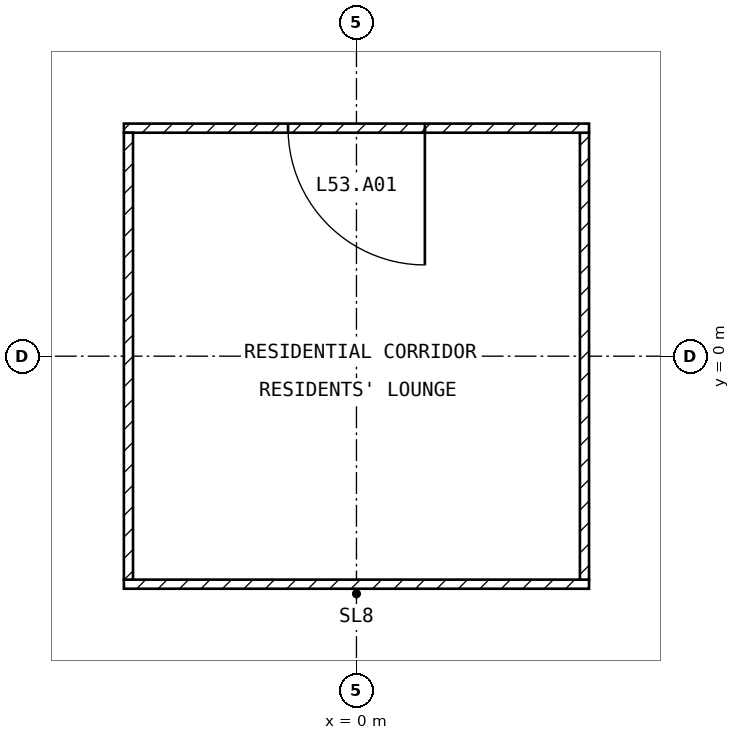
"""IFC4 building model, lengths in metres.
Left out: names, types, materials, properties, quantities, classifications, styles, units other than length and angle.
Written with IfcOpenShell. Run it as: python <this file> out.ifc"""

import sys

from ifc_helpers import new_model, si_unit, direction, frame, frame_2d, origin, place, context, subcontext, project, spatial, rectangle, extrude, element, fill, save


model = new_model("IFC4")
c1 = context("Model", 3, precision=1e-05, world=origin(), true_north=direction((0.0, 1.0)))
c2 = subcontext(c1, "Body", "Model", "MODEL_VIEW")
j1 = project(units=[si_unit("LENGTHUNIT", "METRE"), si_unit("PLANEANGLEUNIT", "RADIAN")], contexts=[c1])
p1 = place(None, origin())
s1 = spatial("IfcSite", under=j1, at=p1, CompositionType="ELEMENT")
p2 = place(p1, origin())
s2 = spatial("IfcBuilding", under=s1, at=p2, CompositionType="ELEMENT")
p3 = place(p2, frame((0.0, 0.0, 212.1)))
s3 = spatial("IfcBuildingStorey", under=s2, at=p3, CompositionType="ELEMENT", Elevation=212.1)
p4 = place(p3, frame((-3.06, -3.0, 0.0), z_axis=(0.0, 0.0, 1.0), x_axis=(1.0, 0.0, 0.0)))
e1 = element("IfcWall", 1, at=p4, inside=s3, PredefinedType="PARTITIONING", context=c2, shape_type="SweptSolid", body=[
    extrude(rectangle(XDim=6.12, YDim=0.12, at=frame_2d((3.06, 0.0))), origin(), (0.0, 0.0, 1.0), 3.25),
])
p5 = place(p3, frame((3.0, -2.94, 0.0), z_axis=(0.0, 0.0, 1.0), x_axis=(0.0, 1.0, 0.0)))
e2 = element("IfcWall", 2, at=p5, inside=s3, PredefinedType="PARTITIONING", context=c2, shape_type="SweptSolid", body=[
    extrude(rectangle(XDim=5.88, YDim=0.12, at=frame_2d((2.94, 0.0))), origin(), (0.0, 0.0, 1.0), 3.25),
])
p6 = place(p3, frame((3.06, 3.0, 0.0), z_axis=(0.0, 0.0, 1.0), x_axis=(-1.0, 0.0, 0.0)))
e3 = element("IfcWall", 3, at=p6, inside=s3, PredefinedType="PARTITIONING", context=c2, shape_type="SweptSolid", body=[
    extrude(rectangle(XDim=6.12, YDim=0.12, at=frame_2d((3.06, 0.0))), origin(), (0.0, 0.0, 1.0), 3.25),
])
p7 = place(p6, frame((2.16, 0.0, 0.0)))
e4 = element("IfcOpeningElement", 4, at=p7, cuts=e3, PredefinedType="OPENING", context=c2, shape_type="SweptSolid", body=[
    extrude(rectangle(XDim=1.8, YDim=2.1, at=frame_2d((0.9, 1.05))), frame((0.0, 0.07, 0.0), z_axis=(0.0, -1.0, 0.0), x_axis=(1.0, 0.0, 0.0)), (0.0, 0.0, 1.0), 0.14),
])
p8 = place(p3, frame((-3.0, 2.94, 0.0), z_axis=(0.0, 0.0, 1.0), x_axis=(0.0, -1.0, 0.0)))
e5 = element("IfcWall", 5, at=p8, inside=s3, PredefinedType="PARTITIONING", context=c2, shape_type="SweptSolid", body=[
    extrude(rectangle(XDim=5.88, YDim=0.12, at=frame_2d((2.94, 0.0))), origin(), (0.0, 0.0, 1.0), 3.25),
])
p9 = place(p7, origin())
e6 = element("IfcDoor", 6, at=p9, inside=s3, OperationType="SINGLE_SWING_LEFT", PredefinedType="DOOR", context=c2, shape_type="SweptSolid", body=[
    extrude(rectangle(XDim=1.8, YDim=2.1, at=frame_2d((0.9, 1.05))), frame((0.0, 0.025, 0.0), z_axis=(0.0, -1.0, 0.0), x_axis=(1.0, 0.0, 0.0)), (0.0, 0.0, 1.0), 0.05),
])
fill(e4, e6)
save(model, sys.argv[1])
